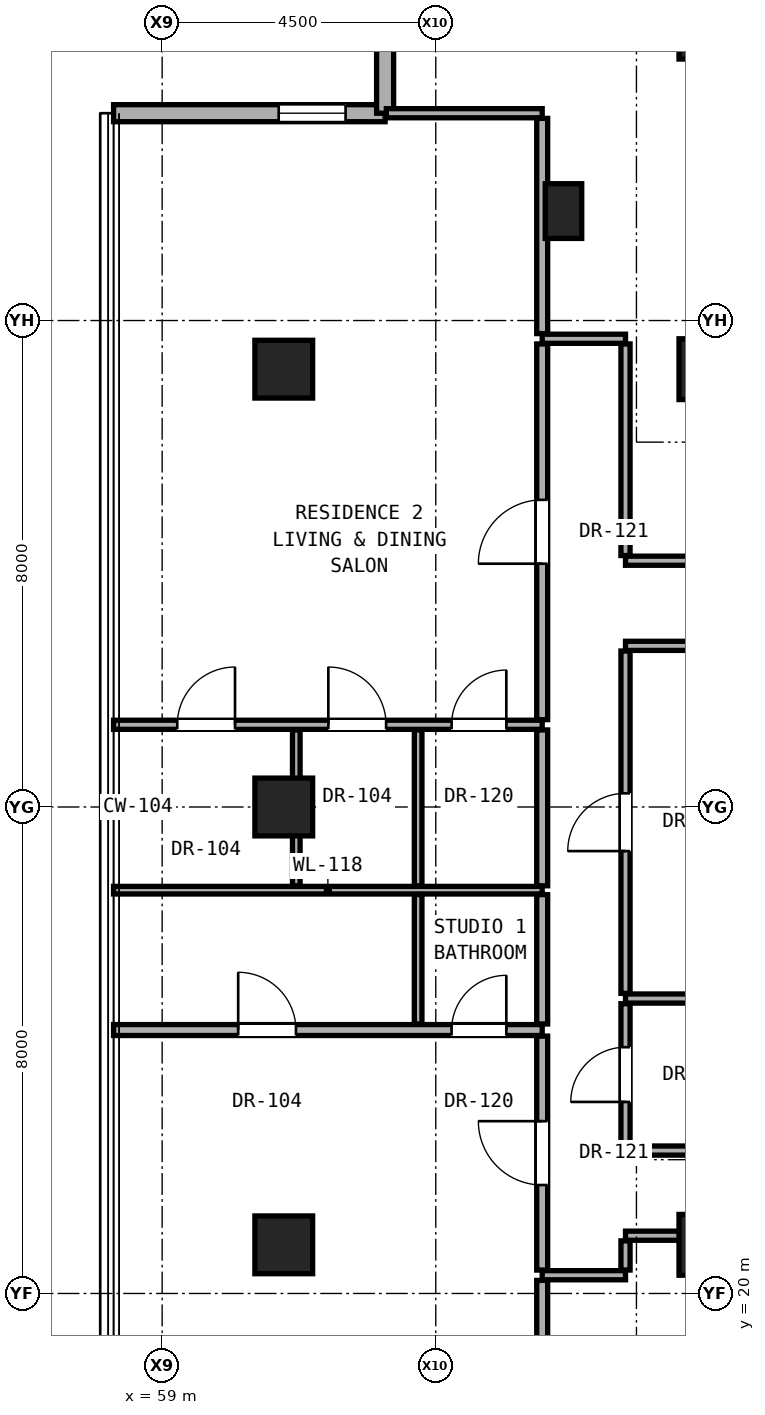
"""IFC4 building model, lengths in metres.
Left out: names, types, materials, properties, quantities, classifications, styles, units other than length and angle.
Written with IfcOpenShell. Run it as: python <this file> out.ifc"""

import sys

from ifc_helpers import new_model, si_unit, direction, frame, frame_2d, origin, origin_2d, place, context, subcontext, project, spatial, rectangle, hollow_rectangle, extrude, element, fill, save


model = new_model("IFC4")
c1 = context("Model", 3, precision=1e-05, world=origin(), true_north=direction((0.0, 1.0)))
c2 = subcontext(c1, "Body", "Model", "MODEL_VIEW")
j1 = project(units=[si_unit("LENGTHUNIT", "METRE"), si_unit("PLANEANGLEUNIT", "RADIAN")], contexts=[c1])
p1 = place(None, origin())
s1 = spatial("IfcSite", under=j1, at=p1, CompositionType="ELEMENT")
p2 = place(p1, origin())
s2 = spatial("IfcBuilding", under=s1, at=p2, CompositionType="ELEMENT")
p3 = place(p2, frame((0.0, 0.0, 177.15)))
s3 = spatial("IfcBuildingStorey", under=s2, at=p3, CompositionType="ELEMENT", Elevation=177.15)
for number, where, z_axis, x_axis in (
    (1, (68.0, 20.8, 0.0), (0.0, 0.0, 1.0), (1.0, 0.0, 0.0)),
    (2, (68.0, 35.2, 0.0), (0.0, 0.0, 1.0), (1.0, 0.0, 0.0)),
    (3, (68.0, 40.8, 0.0), (0.0, 0.0, 1.0), (1.0, 0.0, 0.0)),
):
    element("IfcColumn", number, at=place(p3, frame(where, z_axis=z_axis, x_axis=x_axis)), inside=s3, PredefinedType="COLUMN", context=c2, shape_type="SweptSolid", body=[
        extrude(rectangle(XDim=1.0, YDim=1.0, at=origin_2d()), origin(), (0.0, 0.0, 1.0), 3.25),
    ])
for number, where, z_axis, x_axis in (
    (4, (61.0, 20.8, 0.0), (0.0, 0.0, 1.0), (1.0, 0.0, 0.0)),
    (5, (61.0, 28.0, 0.0), (0.0, 0.0, 1.0), (1.0, 0.0, 0.0)),
    (6, (61.0, 35.2, 0.0), (0.0, 0.0, 1.0), (1.0, 0.0, 0.0)),
):
    element("IfcColumn", number, at=place(p3, frame(where, z_axis=z_axis, x_axis=x_axis)), inside=s3, PredefinedType="COLUMN", context=c2, shape_type="SweptSolid", body=[
        extrude(hollow_rectangle(XDim=0.95, YDim=0.95, WallThickness=0.05, at=origin_2d()), origin(), (0.0, 0.0, 1.0), 3.25),
    ])
p4 = place(p3, frame((65.6, 37.8, 0.0), z_axis=(0.0, 0.0, 1.0), x_axis=(1.0, 0.0, 0.0)))
e7 = element("IfcColumn", 7, at=p4, inside=s3, PredefinedType="PILASTER", context=c2, shape_type="SweptSolid", body=[
    extrude(rectangle(XDim=0.6, YDim=0.9, at=origin_2d()), origin(), (0.0, 0.0, 1.0), 3.25),
])
p5 = place(p3, frame((62.667, 39.409, 0.0), z_axis=(0.0, 0.0, 1.0), x_axis=(-1.0, 0.0, 0.0)))
e8 = element("IfcWall", 8, at=p5, inside=s3, PredefinedType="SOLIDWALL", context=c2, shape_type="SweptSolid", body=[
    extrude(rectangle(XDim=4.465, YDim=0.28, at=frame_2d((2.233, 0.0))), origin(), (0.0, 0.0, 1.0), 3.03),
])
p6 = place(p5, frame((0.65, 0.0, 0.85)))
e9 = element("IfcOpeningElement", 9, at=p6, cuts=e8, PredefinedType="OPENING", context=c2, shape_type="SweptSolid", body=[
    extrude(rectangle(XDim=1.1, YDim=2.0, at=frame_2d((0.55, 1.0))), frame((0.0, 0.15, 0.0), z_axis=(0.0, -1.0, 0.0), x_axis=(1.0, 0.0, 0.0)), (0.0, 0.0, 1.0), 0.3),
])
p7 = place(p3, frame((62.667, 43.875, 0.0), z_axis=(0.0, 0.0, 1.0), x_axis=(0.0, -1.0, 0.0)))
e10 = element("IfcWall", 10, at=p7, inside=s3, PredefinedType="SOLIDWALL", context=c2, shape_type="SweptSolid", body=[
    extrude(rectangle(XDim=4.465, YDim=0.28, at=frame_2d((2.232, 0.0))), origin(), (0.0, 0.0, 1.0), 3.03),
])
p8 = place(p3, frame((65.25, 20.3, 0.0), z_axis=(0.0, 0.0, 1.0), x_axis=(1.0, 0.0, 0.0)))
e11 = element("IfcWall", 11, at=p8, inside=s3, PredefinedType="PARTITIONING", context=c2, shape_type="SweptSolid", body=[
    extrude(rectangle(XDim=1.37, YDim=0.15, at=frame_2d((0.685, 0.0))), origin(), (0.0, 0.0, 1.0), 3.05),
])
p9 = place(p3, frame((66.62, 20.95, 0.0), z_axis=(0.0, 0.0, 1.0), x_axis=(1.0, 0.0, 0.0)))
e12 = element("IfcWall", 12, at=p9, inside=s3, PredefinedType="PARTITIONING", context=c2, shape_type="SweptSolid", body=[
    extrude(rectangle(XDim=1.11, YDim=0.15, at=frame_2d((0.555, 0.0))), origin(), (0.0, 0.0, 1.0), 2.442),
])
p10 = place(p3, frame((66.62, 22.35, 0.0), z_axis=(0.0, 0.0, 1.0), x_axis=(1.0, 0.0, 0.0)))
e13 = element("IfcWall", 13, at=p10, inside=s3, PredefinedType="PARTITIONING", context=c2, shape_type="SweptSolid", body=[
    extrude(rectangle(XDim=10.14, YDim=0.15, at=frame_2d((5.07, 0.0))), origin(), (0.0, 0.0, 1.0), 2.186),
])
p11 = place(p3, frame((58.201, 24.332, 0.0), z_axis=(0.0, 0.0, 1.0), x_axis=(1.0, 0.0, 0.0)))
e14 = element("IfcWall", 14, at=p11, inside=s3, PredefinedType="PARTITIONING", context=c2, shape_type="SweptSolid", body=[
    extrude(rectangle(XDim=7.049, YDim=0.18, at=frame_2d((3.524, 0.0))), origin(), (0.0, 0.0, 1.0), 2.269),
])
p12 = place(p11, frame((2.05, 0.0, 0.0)))
e15 = element("IfcOpeningElement", 15, at=p12, cuts=e14, PredefinedType="OPENING", context=c2, shape_type="SweptSolid", body=[
    extrude(rectangle(XDim=0.95, YDim=2.15, at=frame_2d((0.475, 1.075))), frame((0.0, 0.1, 0.0), z_axis=(0.0, -1.0, 0.0), x_axis=(1.0, 0.0, 0.0)), (0.0, 0.0, 1.0), 0.2),
])
p13 = place(p11, frame((5.559, 0.0, 0.0)))
e16 = element("IfcOpeningElement", 16, at=p13, cuts=e14, PredefinedType="OPENING", context=c2, shape_type="SweptSolid", body=[
    extrude(rectangle(XDim=0.9, YDim=2.1, at=frame_2d((0.45, 1.05))), frame((0.0, 0.1, 0.0), z_axis=(0.0, -1.0, 0.0), x_axis=(1.0, 0.0, 0.0)), (0.0, 0.0, 1.0), 0.2),
])
p14 = place(p3, frame((66.62, 24.85, 0.0), z_axis=(0.0, 0.0, 1.0), x_axis=(1.0, 0.0, 0.0)))
e17 = element("IfcWall", 17, at=p14, inside=s3, PredefinedType="PARTITIONING", context=c2, shape_type="SweptSolid", body=[
    extrude(rectangle(XDim=3.13, YDim=0.15, at=frame_2d((1.565, 0.0))), origin(), (0.0, 0.0, 1.0), 2.186),
])
p15 = place(p3, frame((58.201, 26.632, 0.0), z_axis=(0.0, 0.0, 1.0), x_axis=(1.0, 0.0, 0.0)))
e18 = element("IfcWall", 18, at=p15, inside=s3, PredefinedType="PARTITIONING", context=c2, shape_type="SweptSolid", body=[
    extrude(rectangle(XDim=7.049, YDim=0.125, at=frame_2d((3.524, 0.0))), origin(), (0.0, 0.0, 1.0), 2.269),
])
p16 = place(p3, frame((58.201, 29.352, 0.0), z_axis=(0.0, 0.0, 1.0), x_axis=(1.0, 0.0, 0.0)))
e19 = element("IfcWall", 19, at=p16, inside=s3, PredefinedType="PARTITIONING", context=c2, shape_type="SweptSolid", body=[
    extrude(rectangle(XDim=7.049, YDim=0.15, at=frame_2d((3.524, 0.0))), origin(), (0.0, 0.0, 1.0), 2.269),
])
p17 = place(p16, frame((1.048, 0.0, 0.0)))
e20 = element("IfcOpeningElement", 20, at=p17, cuts=e19, PredefinedType="OPENING", context=c2, shape_type="SweptSolid", body=[
    extrude(rectangle(XDim=0.95, YDim=2.15, at=frame_2d((0.475, 1.075))), frame((0.0, 0.085, 0.0), z_axis=(0.0, -1.0, 0.0), x_axis=(1.0, 0.0, 0.0)), (0.0, 0.0, 1.0), 0.17),
])
p18 = place(p16, frame((3.532, 0.0, 0.0)))
e21 = element("IfcOpeningElement", 21, at=p18, cuts=e19, PredefinedType="OPENING", context=c2, shape_type="SweptSolid", body=[
    extrude(rectangle(XDim=0.95, YDim=2.15, at=frame_2d((0.475, 1.075))), frame((0.0, 0.085, 0.0), z_axis=(0.0, -1.0, 0.0), x_axis=(1.0, 0.0, 0.0)), (0.0, 0.0, 1.0), 0.17),
])
p19 = place(p16, frame((5.559, 0.0, 0.0)))
e22 = element("IfcOpeningElement", 22, at=p19, cuts=e19, PredefinedType="OPENING", context=c2, shape_type="SweptSolid", body=[
    extrude(rectangle(XDim=0.9, YDim=2.1, at=frame_2d((0.45, 1.05))), frame((0.0, 0.085, 0.0), z_axis=(0.0, -1.0, 0.0), x_axis=(1.0, 0.0, 0.0)), (0.0, 0.0, 1.0), 0.17),
])
p20 = place(p3, frame((66.62, 30.65, 0.0), z_axis=(0.0, 0.0, 1.0), x_axis=(1.0, 0.0, 0.0)))
e23 = element("IfcWall", 23, at=p20, inside=s3, PredefinedType="PARTITIONING", context=c2, shape_type="SweptSolid", body=[
    extrude(rectangle(XDim=10.14, YDim=0.15, at=frame_2d((5.07, 0.0))), origin(), (0.0, 0.0, 1.0), 2.186),
])
p21 = place(p20, frame((6.14, 0.0, 0.0)))
e24 = element("IfcOpeningElement", 24, at=p21, cuts=e23, PredefinedType="OPENING", context=c2, shape_type="SweptSolid", body=[
    extrude(rectangle(XDim=0.95, YDim=2.15, at=frame_2d((0.475, 1.075))), frame((0.0, 0.085, 0.0), z_axis=(0.0, -1.0, 0.0), x_axis=(1.0, 0.0, 0.0)), (0.0, 0.0, 1.0), 0.17),
])
p22 = place(p3, frame((66.62, 32.05, 0.0), z_axis=(0.0, 0.0, 1.0), x_axis=(1.0, 0.0, 0.0)))
e25 = element("IfcWall", 25, at=p22, inside=s3, PredefinedType="PARTITIONING", context=c2, shape_type="SweptSolid", body=[
    extrude(rectangle(XDim=2.18, YDim=0.15, at=frame_2d((1.09, 0.0))), origin(), (0.0, 0.0, 1.0), 2.186),
])
p23 = place(p3, frame((65.25, 35.7, 0.0), z_axis=(0.0, 0.0, 1.0), x_axis=(1.0, 0.0, 0.0)))
e26 = element("IfcWall", 26, at=p23, inside=s3, PredefinedType="PARTITIONING", context=c2, shape_type="SweptSolid", body=[
    extrude(rectangle(XDim=1.37, YDim=0.15, at=frame_2d((0.685, 0.0))), origin(), (0.0, 0.0, 1.0), 3.05),
])
p24 = place(p3, frame((62.687, 39.409, 0.0), z_axis=(0.0, 0.0, 1.0), x_axis=(1.0, 0.0, 0.0)))
e27 = element("IfcWall", 27, at=p24, inside=s3, PredefinedType="PARTITIONING", context=c2, shape_type="SweptSolid", body=[
    extrude(rectangle(XDim=2.563, YDim=0.15, at=frame_2d((1.282, 0.0))), origin(), (0.0, 0.0, 1.0), 3.05),
])
p25 = place(p3, frame((61.206, 26.705, 0.0), z_axis=(0.0, 0.0, 1.0), x_axis=(0.0, 1.0, 0.0)))
e28 = element("IfcWall", 28, at=p25, inside=s3, PredefinedType="PARTITIONING", context=c2, shape_type="SweptSolid", body=[
    extrude(rectangle(XDim=2.562, YDim=0.125, at=frame_2d((1.281, 0.0))), origin(), (0.0, 0.0, 1.0), 2.269),
])
p26 = place(p3, frame((63.21, 24.432, 0.0), z_axis=(0.0, 0.0, 1.0), x_axis=(0.0, 1.0, 0.0)))
e29 = element("IfcWall", 29, at=p26, inside=s3, PredefinedType="PARTITIONING", context=c2, shape_type="SweptSolid", body=[
    extrude(rectangle(XDim=2.128, YDim=0.125, at=frame_2d((1.064, 0.0))), origin(), (0.0, 0.0, 1.0), 3.05),
])
p27 = place(p3, frame((63.21, 26.705, 0.0), z_axis=(0.0, 0.0, 1.0), x_axis=(0.0, 1.0, 0.0)))
e30 = element("IfcWall", 30, at=p27, inside=s3, PredefinedType="PARTITIONING", context=c2, shape_type="SweptSolid", body=[
    extrude(rectangle(XDim=2.562, YDim=0.125, at=frame_2d((1.281, 0.0))), origin(), (0.0, 0.0, 1.0), 2.346),
])
p28 = place(p3, frame((65.25, 16.691, 0.0), z_axis=(0.0, 0.0, 1.0), x_axis=(0.0, 1.0, 0.0)))
e31 = element("IfcWall", 31, at=p28, inside=s3, PredefinedType="PARTITIONING", context=c2, shape_type="SweptSolid", body=[
    extrude(rectangle(XDim=3.524, YDim=0.18, at=frame_2d((1.762, 0.0))), origin(), (0.0, 0.0, 1.0), 2.493),
])
p29 = place(p3, frame((65.25, 20.385, 0.0), z_axis=(0.0, 0.0, 1.0), x_axis=(0.0, 1.0, 0.0)))
e32 = element("IfcWall", 32, at=p29, inside=s3, PredefinedType="PARTITIONING", context=c2, shape_type="SweptSolid", body=[
    extrude(rectangle(XDim=3.847, YDim=0.18, at=frame_2d((1.923, 0.0))), origin(), (0.0, 0.0, 1.0), 2.442),
])
p30 = place(p29, frame((1.398, 0.0, 0.0)))
e33 = element("IfcOpeningElement", 33, at=p30, cuts=e32, PredefinedType="OPENING", context=c2, shape_type="SweptSolid", body=[
    extrude(rectangle(XDim=1.05, YDim=2.2, at=frame_2d((0.525, 1.1))), frame((0.0, 0.1, 0.0), z_axis=(0.0, -1.0, 0.0), x_axis=(1.0, 0.0, 0.0)), (0.0, 0.0, 1.0), 0.2),
])
p31 = place(p3, frame((65.25, 24.432, 0.0), z_axis=(0.0, 0.0, 1.0), x_axis=(0.0, 1.0, 0.0)))
e34 = element("IfcWall", 34, at=p31, inside=s3, PredefinedType="PARTITIONING", context=c2, shape_type="SweptSolid", body=[
    extrude(rectangle(XDim=2.128, YDim=0.18, at=frame_2d((1.064, 0.0))), origin(), (0.0, 0.0, 1.0), 3.05),
])
p32 = place(p3, frame((65.25, 26.705, 0.0), z_axis=(0.0, 0.0, 1.0), x_axis=(0.0, 1.0, 0.0)))
e35 = element("IfcWall", 35, at=p32, inside=s3, PredefinedType="PARTITIONING", context=c2, shape_type="SweptSolid", body=[
    extrude(rectangle(XDim=2.562, YDim=0.18, at=frame_2d((1.281, 0.0))), origin(), (0.0, 0.0, 1.0), 2.346),
])
p33 = place(p3, frame((65.25, 29.437, 0.0), z_axis=(0.0, 0.0, 1.0), x_axis=(0.0, 1.0, 0.0)))
e36 = element("IfcWall", 36, at=p33, inside=s3, PredefinedType="PARTITIONING", context=c2, shape_type="SweptSolid", body=[
    extrude(rectangle(XDim=6.178, YDim=0.18, at=frame_2d((3.089, 0.0))), origin(), (0.0, 0.0, 1.0), 2.442),
])
p34 = place(p33, frame((2.564, 0.0, 0.0)))
e37 = element("IfcOpeningElement", 37, at=p34, cuts=e36, PredefinedType="OPENING", context=c2, shape_type="SweptSolid", body=[
    extrude(rectangle(XDim=1.05, YDim=2.2, at=frame_2d((0.525, 1.1))), frame((0.0, 0.1, 0.0), z_axis=(0.0, -1.0, 0.0), x_axis=(1.0, 0.0, 0.0)), (0.0, 0.0, 1.0), 0.2),
])
p35 = place(p3, frame((65.25, 35.785, 0.0), z_axis=(0.0, 0.0, 1.0), x_axis=(0.0, 1.0, 0.0)))
e38 = element("IfcWall", 38, at=p35, inside=s3, PredefinedType="PARTITIONING", context=c2, shape_type="SweptSolid", body=[
    extrude(rectangle(XDim=3.539, YDim=0.18, at=frame_2d((1.77, 0.0))), origin(), (0.0, 0.0, 1.0), 2.493),
])
p36 = place(p3, frame((66.62, 20.385, 0.0), z_axis=(0.0, 0.0, 1.0), x_axis=(0.0, 1.0, 0.0)))
e39 = element("IfcWall", 39, at=p36, inside=s3, PredefinedType="PARTITIONING", context=c2, shape_type="SweptSolid", body=[
    extrude(rectangle(XDim=0.48, YDim=0.15, at=frame_2d((0.24, 0.0))), origin(), (0.0, 0.0, 1.0), 2.442),
])
p37 = place(p3, frame((66.62, 22.435, 0.0), z_axis=(0.0, 0.0, 1.0), x_axis=(0.0, 1.0, 0.0)))
e40 = element("IfcWall", 40, at=p37, inside=s3, PredefinedType="PARTITIONING", context=c2, shape_type="SweptSolid", body=[
    extrude(rectangle(XDim=2.33, YDim=0.15, at=frame_2d((1.165, 0.0))), origin(), (0.0, 0.0, 1.0), 3.05),
])
p38 = place(p37, frame((0.715, 0.0, 0.0)))
e41 = element("IfcOpeningElement", 41, at=p38, cuts=e40, PredefinedType="OPENING", context=c2, shape_type="SweptSolid", body=[
    extrude(rectangle(XDim=0.9, YDim=2.1, at=frame_2d((0.45, 1.05))), frame((0.0, 0.085, 0.0), z_axis=(0.0, -1.0, 0.0), x_axis=(1.0, 0.0, 0.0)), (0.0, 0.0, 1.0), 0.17),
])
p39 = place(p3, frame((66.62, 24.935, 0.0), z_axis=(0.0, 0.0, 1.0), x_axis=(0.0, 1.0, 0.0)))
e42 = element("IfcWall", 42, at=p39, inside=s3, PredefinedType="PARTITIONING", context=c2, shape_type="SweptSolid", body=[
    extrude(rectangle(XDim=5.63, YDim=0.15, at=frame_2d((2.815, 0.0))), origin(), (0.0, 0.0, 1.0), 2.346),
])
p40 = place(p39, frame((2.34, 0.0, 0.0)))
e43 = element("IfcOpeningElement", 43, at=p40, cuts=e42, PredefinedType="OPENING", context=c2, shape_type="SweptSolid", body=[
    extrude(rectangle(XDim=0.95, YDim=2.15, at=frame_2d((0.475, 1.075))), frame((0.0, 0.085, 0.0), z_axis=(0.0, -1.0, 0.0), x_axis=(1.0, 0.0, 0.0)), (0.0, 0.0, 1.0), 0.17),
])
p41 = place(p3, frame((66.62, 32.135, 0.0), z_axis=(0.0, 0.0, 1.0), x_axis=(0.0, 1.0, 0.0)))
e44 = element("IfcWall", 44, at=p41, inside=s3, PredefinedType="PARTITIONING", context=c2, shape_type="SweptSolid", body=[
    extrude(rectangle(XDim=3.48, YDim=0.15, at=frame_2d((1.74, 0.0))), origin(), (0.0, 0.0, 1.0), 2.442),
])
p42 = place(p6, origin())
e45 = element("IfcWindow", 45, at=p42, inside=s3, PartitioningType="SINGLE_PANEL", PredefinedType="WINDOW", context=c2, shape_type="SweptSolid", body=[
    extrude(rectangle(XDim=1.1, YDim=2.0, at=frame_2d((0.55, 1.0))), frame((0.0, 0.03, 0.0), z_axis=(0.0, -1.0, 0.0), x_axis=(1.0, 0.0, 0.0)), (0.0, 0.0, 1.0), 0.06),
])
fill(e9, e45)
p43 = place(p38, origin())
e46 = element("IfcDoor", 46, at=p43, inside=s3, OperationType="SINGLE_SWING_LEFT", PredefinedType="DOOR", context=c2, shape_type="SweptSolid", body=[
    extrude(rectangle(XDim=0.9, YDim=2.1, at=frame_2d((0.45, 1.05))), frame((0.0, 0.025, 0.0), z_axis=(0.0, -1.0, 0.0), x_axis=(1.0, 0.0, 0.0)), (0.0, 0.0, 1.0), 0.05),
])
fill(e41, e46)
p44 = place(p30, origin())
e47 = element("IfcDoor", 47, at=p44, inside=s3, OperationType="SINGLE_SWING_RIGHT", PredefinedType="DOOR", context=c2, shape_type="SweptSolid", body=[
    extrude(rectangle(XDim=1.05, YDim=2.2, at=frame_2d((0.525, 1.1))), frame((0.0, 0.025, 0.0), z_axis=(0.0, -1.0, 0.0), x_axis=(1.0, 0.0, 0.0)), (0.0, 0.0, 1.0), 0.05),
])
fill(e33, e47)
p45 = place(p12, origin())
e48 = element("IfcDoor", 48, at=p45, inside=s3, OperationType="SINGLE_SWING_LEFT", PredefinedType="DOOR", context=c2, shape_type="SweptSolid", body=[
    extrude(rectangle(XDim=0.95, YDim=2.15, at=frame_2d((0.475, 1.075))), frame((0.0, 0.025, 0.0), z_axis=(0.0, -1.0, 0.0), x_axis=(1.0, 0.0, 0.0)), (0.0, 0.0, 1.0), 0.05),
])
fill(e15, e48)
p46 = place(p13, origin())
e49 = element("IfcDoor", 49, at=p46, inside=s3, OperationType="SINGLE_SWING_RIGHT", PredefinedType="DOOR", context=c2, shape_type="SweptSolid", body=[
    extrude(rectangle(XDim=0.9, YDim=2.1, at=frame_2d((0.45, 1.05))), frame((0.0, 0.025, 0.0), z_axis=(0.0, -1.0, 0.0), x_axis=(1.0, 0.0, 0.0)), (0.0, 0.0, 1.0), 0.05),
])
fill(e16, e49)
p47 = place(p34, origin())
e50 = element("IfcDoor", 50, at=p47, inside=s3, OperationType="SINGLE_SWING_LEFT", PredefinedType="DOOR", context=c2, shape_type="SweptSolid", body=[
    extrude(rectangle(XDim=1.05, YDim=2.2, at=frame_2d((0.525, 1.1))), frame((0.0, 0.025, 0.0), z_axis=(0.0, -1.0, 0.0), x_axis=(1.0, 0.0, 0.0)), (0.0, 0.0, 1.0), 0.05),
])
fill(e37, e50)
p48 = place(p17, origin())
e51 = element("IfcDoor", 51, at=p48, inside=s3, OperationType="SINGLE_SWING_RIGHT", PredefinedType="DOOR", context=c2, shape_type="SweptSolid", body=[
    extrude(rectangle(XDim=0.95, YDim=2.15, at=frame_2d((0.475, 1.075))), frame((0.0, 0.025, 0.0), z_axis=(0.0, -1.0, 0.0), x_axis=(1.0, 0.0, 0.0)), (0.0, 0.0, 1.0), 0.05),
])
fill(e20, e51)
p49 = place(p18, origin())
e52 = element("IfcDoor", 52, at=p49, inside=s3, OperationType="SINGLE_SWING_LEFT", PredefinedType="DOOR", context=c2, shape_type="SweptSolid", body=[
    extrude(rectangle(XDim=0.95, YDim=2.15, at=frame_2d((0.475, 1.075))), frame((0.0, 0.025, 0.0), z_axis=(0.0, -1.0, 0.0), x_axis=(1.0, 0.0, 0.0)), (0.0, 0.0, 1.0), 0.05),
])
fill(e21, e52)
p50 = place(p19, origin())
e53 = element("IfcDoor", 53, at=p50, inside=s3, OperationType="SINGLE_SWING_RIGHT", PredefinedType="DOOR", context=c2, shape_type="SweptSolid", body=[
    extrude(rectangle(XDim=0.9, YDim=2.1, at=frame_2d((0.45, 1.05))), frame((0.0, 0.025, 0.0), z_axis=(0.0, -1.0, 0.0), x_axis=(1.0, 0.0, 0.0)), (0.0, 0.0, 1.0), 0.05),
])
fill(e22, e53)
p51 = place(p40, origin())
e54 = element("IfcDoor", 54, at=p51, inside=s3, OperationType="SINGLE_SWING_LEFT", PredefinedType="DOOR", context=c2, shape_type="SweptSolid", body=[
    extrude(rectangle(XDim=0.95, YDim=2.15, at=frame_2d((0.475, 1.075))), frame((0.0, 0.025, 0.0), z_axis=(0.0, -1.0, 0.0), x_axis=(1.0, 0.0, 0.0)), (0.0, 0.0, 1.0), 0.05),
])
fill(e43, e54)
save(model, sys.argv[1])
